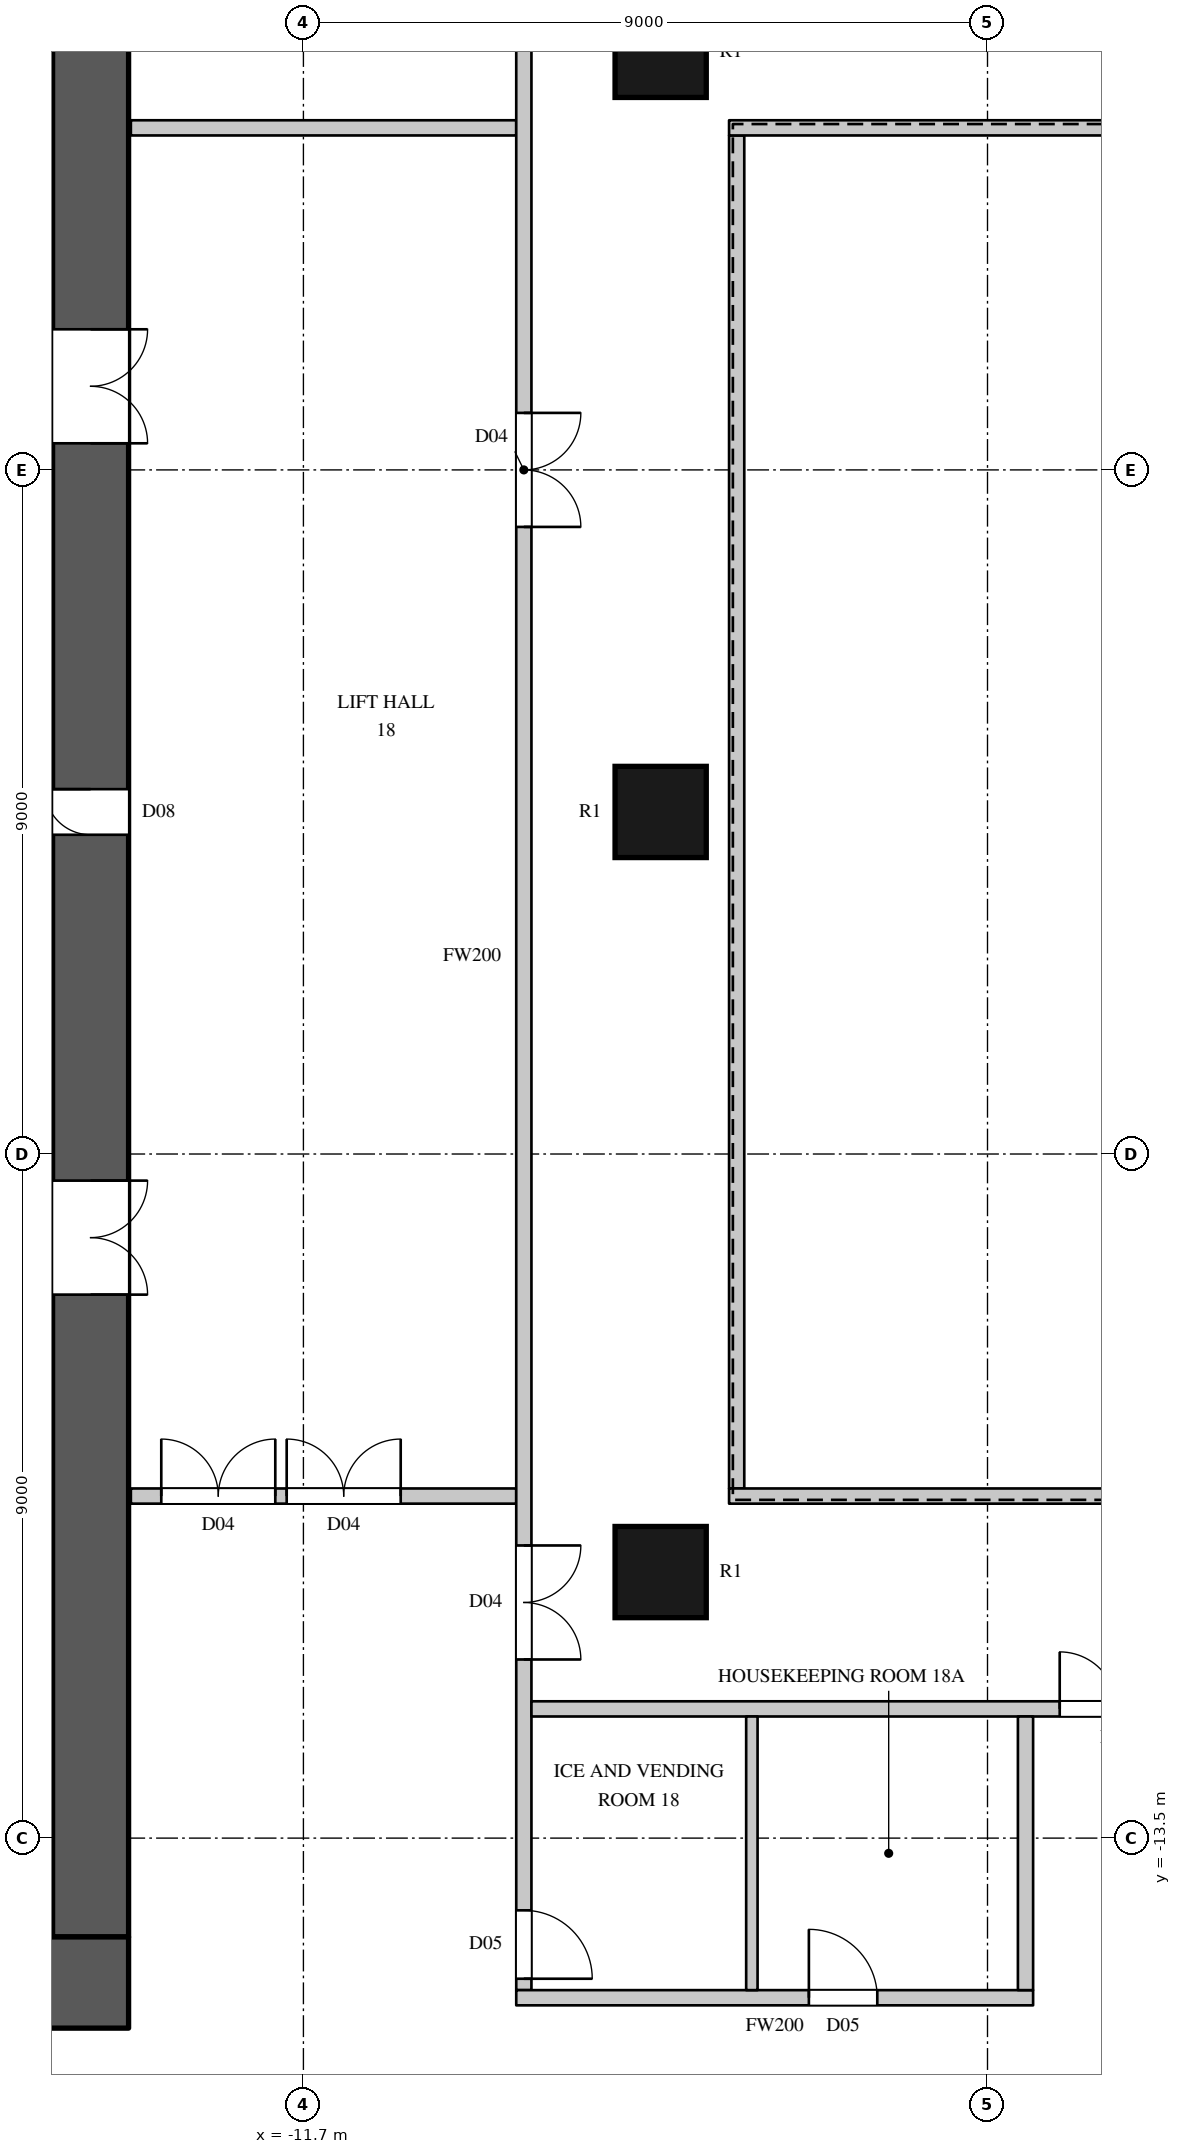
"""IFC4 building model, lengths in metres.
Left out: names, types, materials, properties, quantities, classifications, styles, units other than length and angle.
Written with IfcOpenShell. Run it as: python <this file> out.ifc"""

import sys

from ifc_helpers import new_model, si_unit, direction, frame, frame_2d, origin, origin_2d, place, context, subcontext, project, spatial, rectangle, circle, extrude, element, fill, save


model = new_model("IFC4")
c1 = context("Model", 3, precision=1e-05, world=origin(), true_north=direction((0.0, 1.0)))
c2 = subcontext(c1, "Body", "Model", "MODEL_VIEW")
j1 = project(units=[si_unit("LENGTHUNIT", "METRE"), si_unit("PLANEANGLEUNIT", "RADIAN")], contexts=[c1])
p1 = place(None, origin())
s1 = spatial("IfcSite", under=j1, at=p1, CompositionType="ELEMENT")
p2 = place(p1, origin())
s2 = spatial("IfcBuilding", under=s1, at=p2, CompositionType="ELEMENT")
p3 = place(p2, frame((0.0, 0.0, 95.1)))
s3 = spatial("IfcBuildingStorey", under=s2, at=p3, CompositionType="ELEMENT", Elevation=95.1)
for number, where, z_axis, x_axis in (
    (1, (-7.0, -10.0, 0.0), (0.0, 0.0, 1.0), (1.0, 0.0, 0.0)),
    (2, (-7.0, 0.0, 0.0), (0.0, 0.0, 1.0), (1.0, 0.0, 0.0)),
    (3, (-7.0, 10.0, 0.0), (0.0, 0.0, 1.0), (1.0, 0.0, 0.0)),
):
    element("IfcColumn", number, at=place(p3, frame(where, z_axis=z_axis, x_axis=x_axis)), inside=s3, PredefinedType="COLUMN", context=c2, shape_type="SweptSolid", body=[
        extrude(circle(Radius=0.6, at=origin_2d()), origin(), (0.0, 0.0, 1.0), 3.6),
    ])
p4 = place(p3, frame((-30.0, -15.4, 0.0), z_axis=(0.0, 0.0, 1.0), x_axis=(1.0, 0.0, 0.0)))
e4 = element("IfcWall", 4, at=p4, inside=s3, PredefinedType="SHEAR", context=c2, shape_type="SweptSolid", body=[
    extrude(rectangle(XDim=16.0, YDim=1.2, at=frame_2d((8.0, 0.0))), origin(), (0.0, 0.0, 1.0), 3.6),
])
p5 = place(p4, frame((13.4, 0.0, 0.0)))
e5 = element("IfcOpeningElement", 5, at=p5, cuts=e4, PredefinedType="OPENING", context=c2, shape_type="SweptSolid", body=[
    extrude(rectangle(XDim=1.5, YDim=2.4, at=frame_2d((0.75, 1.2))), frame((0.0, 0.61, 0.0), z_axis=(0.0, -1.0, 0.0), x_axis=(1.0, 0.0, 0.0)), (0.0, 0.0, 1.0), 1.22),
])
p6 = place(p3, frame((-14.5, -14.8, 0.0), z_axis=(0.0, 0.0, 1.0), x_axis=(0.0, 1.0, 0.0)))
e6 = element("IfcWall", 6, at=p6, inside=s3, PredefinedType="SHEAR", context=c2, shape_type="SweptSolid", body=[
    extrude(rectangle(XDim=29.6, YDim=1.0, at=frame_2d((14.8, 0.0))), origin(), (0.0, 0.0, 1.0), 3.6),
])
p7 = place(p6, frame((8.45, 0.0, 0.0)))
e7 = element("IfcOpeningElement", 7, at=p7, cuts=e6, PredefinedType="OPENING", context=c2, shape_type="SweptSolid", body=[
    extrude(rectangle(XDim=1.5, YDim=2.4, at=frame_2d((0.75, 1.2))), frame((0.0, 0.51, 0.0), z_axis=(0.0, -1.0, 0.0), x_axis=(1.0, 0.0, 0.0)), (0.0, 0.0, 1.0), 1.02),
])
p8 = place(p6, frame((19.65, 0.0, 0.0)))
e8 = element("IfcOpeningElement", 8, at=p8, cuts=e6, PredefinedType="OPENING", context=c2, shape_type="SweptSolid", body=[
    extrude(rectangle(XDim=1.5, YDim=2.4, at=frame_2d((0.75, 1.2))), frame((0.0, 0.51, 0.0), z_axis=(0.0, -1.0, 0.0), x_axis=(1.0, 0.0, 0.0)), (0.0, 0.0, 1.0), 1.02),
])
p9 = place(p6, frame((14.5, 0.0, 0.0)))
e9 = element("IfcOpeningElement", 9, at=p9, cuts=e6, PredefinedType="OPENING", context=c2, shape_type="SweptSolid", body=[
    extrude(rectangle(XDim=0.6, YDim=2.0, at=frame_2d((0.3, 1.0))), frame((0.0, 0.51, 0.0), z_axis=(0.0, -1.0, 0.0), x_axis=(1.0, 0.0, 0.0)), (0.0, 0.0, 1.0), 1.02),
])
p10 = place(p3, frame((-13.97, -9.0, 0.0), z_axis=(0.0, 0.0, 1.0), x_axis=(1.0, 0.0, 0.0)))
e10 = element("IfcWall", 10, at=p10, inside=s3, PredefinedType="PARTITIONING", context=c2, shape_type="SweptSolid", body=[
    extrude(rectangle(XDim=5.07, YDim=0.2, at=frame_2d((2.535, 0.0))), origin(), (0.0, 0.0, 1.0), 3.3),
])
p11 = place(p10, frame((0.4, 0.0, 0.0)))
e11 = element("IfcOpeningElement", 11, at=p11, cuts=e10, PredefinedType="OPENING", context=c2, shape_type="SweptSolid", body=[
    extrude(rectangle(XDim=1.5, YDim=2.2, at=frame_2d((0.75, 1.1))), frame((0.0, 0.11, 0.0), z_axis=(0.0, -1.0, 0.0), x_axis=(1.0, 0.0, 0.0)), (0.0, 0.0, 1.0), 0.22),
])
p12 = place(p10, frame((2.05, 0.0, 0.0)))
e12 = element("IfcOpeningElement", 12, at=p12, cuts=e10, PredefinedType="OPENING", context=c2, shape_type="SweptSolid", body=[
    extrude(rectangle(XDim=1.5, YDim=2.2, at=frame_2d((0.75, 1.1))), frame((0.0, 0.11, 0.0), z_axis=(0.0, -1.0, 0.0), x_axis=(1.0, 0.0, 0.0)), (0.0, 0.0, 1.0), 0.22),
])
p13 = place(p3, frame((-13.97, 9.0, 0.0), z_axis=(0.0, 0.0, 1.0), x_axis=(1.0, 0.0, 0.0)))
e13 = element("IfcWall", 13, at=p13, inside=s3, PredefinedType="PARTITIONING", context=c2, shape_type="SweptSolid", body=[
    extrude(rectangle(XDim=5.07, YDim=0.2, at=frame_2d((2.535, 0.0))), origin(), (0.0, 0.0, 1.0), 3.3),
])
p14 = place(p3, frame((-8.8, -15.5, 0.0), z_axis=(0.0, 0.0, 1.0), x_axis=(0.0, 1.0, 0.0)))
e14 = element("IfcWall", 14, at=p14, inside=s3, PredefinedType="PARTITIONING", context=c2, shape_type="SweptSolid", body=[
    extrude(rectangle(XDim=27.2, YDim=0.2, at=frame_2d((13.6, 0.0))), origin(), (0.0, 0.0, 1.0), 3.3),
])
p15 = place(p14, frame((19.25, 0.0, 0.0)))
e15 = element("IfcOpeningElement", 15, at=p15, cuts=e14, PredefinedType="OPENING", context=c2, shape_type="SweptSolid", body=[
    extrude(rectangle(XDim=1.5, YDim=2.2, at=frame_2d((0.75, 1.1))), frame((0.0, 0.11, 0.0), z_axis=(0.0, -1.0, 0.0), x_axis=(1.0, 0.0, 0.0)), (0.0, 0.0, 1.0), 0.22),
])
p16 = place(p14, frame((4.35, 0.0, 0.0)))
e16 = element("IfcOpeningElement", 16, at=p16, cuts=e14, PredefinedType="OPENING", context=c2, shape_type="SweptSolid", body=[
    extrude(rectangle(XDim=1.5, YDim=2.2, at=frame_2d((0.75, 1.1))), frame((0.0, 0.11, 0.0), z_axis=(0.0, -1.0, 0.0), x_axis=(1.0, 0.0, 0.0)), (0.0, 0.0, 1.0), 0.22),
])
p17 = place(p14, frame((25.55, 0.0, 0.0)))
e17 = element("IfcOpeningElement", 17, at=p17, cuts=e14, PredefinedType="OPENING", context=c2, shape_type="SweptSolid", body=[
    extrude(rectangle(XDim=1.5, YDim=2.2, at=frame_2d((0.75, 1.1))), frame((0.0, 0.11, 0.0), z_axis=(0.0, -1.0, 0.0), x_axis=(1.0, 0.0, 0.0)), (0.0, 0.0, 1.0), 0.22),
])
p18 = place(p14, frame((0.15, 0.0, 0.0)))
e18 = element("IfcOpeningElement", 18, at=p18, cuts=e14, PredefinedType="OPENING", context=c2, shape_type="SweptSolid", body=[
    extrude(rectangle(XDim=0.9, YDim=2.2, at=frame_2d((0.45, 1.1))), frame((0.0, 0.11, 0.0), z_axis=(0.0, -1.0, 0.0), x_axis=(1.0, 0.0, 0.0)), (0.0, 0.0, 1.0), 0.22),
])
p19 = place(p3, frame((-8.9, -15.6, 0.0), z_axis=(0.0, 0.0, 1.0), x_axis=(1.0, 0.0, 0.0)))
e19 = element("IfcWall", 19, at=p19, inside=s3, PredefinedType="PARTITIONING", context=c2, shape_type="SweptSolid", body=[
    extrude(rectangle(XDim=6.8, YDim=0.2, at=frame_2d((3.4, 0.0))), origin(), (0.0, 0.0, 1.0), 3.3),
])
p20 = place(p19, frame((3.85, 0.0, 0.0)))
e20 = element("IfcOpeningElement", 20, at=p20, cuts=e19, PredefinedType="OPENING", context=c2, shape_type="SweptSolid", body=[
    extrude(rectangle(XDim=0.9, YDim=2.2, at=frame_2d((0.45, 1.1))), frame((0.0, 0.11, 0.0), z_axis=(0.0, -1.0, 0.0), x_axis=(1.0, 0.0, 0.0)), (0.0, 0.0, 1.0), 0.22),
])
p21 = place(p3, frame((-8.7, -11.8, 0.0), z_axis=(0.0, 0.0, 1.0), x_axis=(1.0, 0.0, 0.0)))
e21 = element("IfcWall", 21, at=p21, inside=s3, PredefinedType="PARTITIONING", context=c2, shape_type="SweptSolid", body=[
    extrude(rectangle(XDim=19.4, YDim=0.2, at=frame_2d((9.7, 0.0))), origin(), (0.0, 0.0, 1.0), 3.3),
])
p22 = place(p21, frame((6.95, 0.0, 0.0)))
e22 = element("IfcOpeningElement", 22, at=p22, cuts=e21, PredefinedType="OPENING", context=c2, shape_type="SweptSolid", body=[
    extrude(rectangle(XDim=1.5, YDim=2.2, at=frame_2d((0.75, 1.1))), frame((0.0, 0.11, 0.0), z_axis=(0.0, -1.0, 0.0), x_axis=(1.0, 0.0, 0.0)), (0.0, 0.0, 1.0), 0.22),
])
p23 = place(p3, frame((-6.0, -8.9, 0.0), z_axis=(0.0, 0.0, 1.0), x_axis=(0.0, 1.0, 0.0)))
e23 = element("IfcWall", 23, at=p23, inside=s3, PredefinedType="PARTITIONING", context=c2, shape_type="SweptSolid", body=[
    extrude(rectangle(XDim=17.8, YDim=0.2, at=frame_2d((8.9, 0.0))), origin(), (0.0, 0.0, 1.0), 3.3),
])
for number, where, z_axis, x_axis in (
    (24, (-6.1, -9.0, 0.0), (0.0, 0.0, 1.0), (1.0, 0.0, 0.0)),
    (25, (-6.1, 9.0, 0.0), (0.0, 0.0, 1.0), (1.0, 0.0, 0.0)),
):
    element("IfcWall", number, at=place(p3, frame(where, z_axis=z_axis, x_axis=x_axis)), inside=s3, PredefinedType="PARTITIONING", context=c2, shape_type="SweptSolid", body=[
        extrude(rectangle(XDim=14.2, YDim=0.2, at=frame_2d((7.1, 0.0))), origin(), (0.0, 0.0, 1.0), 3.3),
    ])
p24 = place(p3, frame((-2.2, -15.5, 0.0), z_axis=(0.0, 0.0, 1.0), x_axis=(0.0, 1.0, 0.0)))
e26 = element("IfcWall", 26, at=p24, inside=s3, PredefinedType="PARTITIONING", context=c2, shape_type="SweptSolid", body=[
    extrude(rectangle(XDim=3.6, YDim=0.2, at=frame_2d((1.8, 0.0))), origin(), (0.0, 0.0, 1.0), 3.3),
])
p25 = place(p3, frame((-5.8, -15.5, 0.0), z_axis=(0.0, 0.0, 1.0), x_axis=(0.0, 1.0, 0.0)))
e27 = element("IfcWall", 27, at=p25, inside=s3, PredefinedType="PARTITIONING", context=c2, shape_type="SweptSolid", body=[
    extrude(rectangle(XDim=3.6, YDim=0.15, at=frame_2d((1.8, 0.0))), origin(), (0.0, 0.0, 1.0), 3.3),
])
p26 = place(p15, origin())
e28 = element("IfcDoor", 28, at=p26, inside=s3, OperationType="DOUBLE_DOOR_SINGLE_SWING", PredefinedType="DOOR", context=c2, shape_type="SweptSolid", body=[
    extrude(rectangle(XDim=1.5, YDim=2.2, at=frame_2d((0.75, 1.1))), frame((0.0, 0.025, 0.0), z_axis=(0.0, -1.0, 0.0), x_axis=(1.0, 0.0, 0.0)), (0.0, 0.0, 1.0), 0.05),
])
fill(e15, e28)
p27 = place(p11, origin())
e29 = element("IfcDoor", 29, at=p27, inside=s3, OperationType="DOUBLE_DOOR_SINGLE_SWING", PredefinedType="DOOR", context=c2, shape_type="SweptSolid", body=[
    extrude(rectangle(XDim=1.5, YDim=2.2, at=frame_2d((0.75, 1.1))), frame((0.0, 0.025, 0.0), z_axis=(0.0, -1.0, 0.0), x_axis=(1.0, 0.0, 0.0)), (0.0, 0.0, 1.0), 0.05),
])
fill(e11, e29)
p28 = place(p12, origin())
e30 = element("IfcDoor", 30, at=p28, inside=s3, OperationType="DOUBLE_DOOR_SINGLE_SWING", PredefinedType="DOOR", context=c2, shape_type="SweptSolid", body=[
    extrude(rectangle(XDim=1.5, YDim=2.2, at=frame_2d((0.75, 1.1))), frame((0.0, 0.025, 0.0), z_axis=(0.0, -1.0, 0.0), x_axis=(1.0, 0.0, 0.0)), (0.0, 0.0, 1.0), 0.05),
])
fill(e12, e30)
p29 = place(p16, origin())
e31 = element("IfcDoor", 31, at=p29, inside=s3, OperationType="DOUBLE_DOOR_SINGLE_SWING", PredefinedType="DOOR", context=c2, shape_type="SweptSolid", body=[
    extrude(rectangle(XDim=1.5, YDim=2.2, at=frame_2d((0.75, 1.1))), frame((0.0, 0.025, 0.0), z_axis=(0.0, -1.0, 0.0), x_axis=(1.0, 0.0, 0.0)), (0.0, 0.0, 1.0), 0.05),
])
fill(e16, e31)
p30 = place(p22, origin())
e32 = element("IfcDoor", 32, at=p30, inside=s3, OperationType="DOUBLE_DOOR_SINGLE_SWING", PredefinedType="DOOR", context=c2, shape_type="SweptSolid", body=[
    extrude(rectangle(XDim=1.5, YDim=2.2, at=frame_2d((0.75, 1.1))), frame((0.0, 0.025, 0.0), z_axis=(0.0, -1.0, 0.0), x_axis=(1.0, 0.0, 0.0)), (0.0, 0.0, 1.0), 0.05),
])
fill(e22, e32)
p31 = place(p18, origin())
e33 = element("IfcDoor", 33, at=p31, inside=s3, OperationType="SINGLE_SWING_RIGHT", PredefinedType="DOOR", context=c2, shape_type="SweptSolid", body=[
    extrude(rectangle(XDim=0.9, YDim=2.2, at=frame_2d((0.45, 1.1))), frame((0.0, 0.025, 0.0), z_axis=(0.0, -1.0, 0.0), x_axis=(1.0, 0.0, 0.0)), (0.0, 0.0, 1.0), 0.05),
])
fill(e18, e33)
p32 = place(p20, origin())
e34 = element("IfcDoor", 34, at=p32, inside=s3, OperationType="SINGLE_SWING_LEFT", PredefinedType="DOOR", context=c2, shape_type="SweptSolid", body=[
    extrude(rectangle(XDim=0.9, YDim=2.2, at=frame_2d((0.45, 1.1))), frame((0.0, 0.025, 0.0), z_axis=(0.0, -1.0, 0.0), x_axis=(1.0, 0.0, 0.0)), (0.0, 0.0, 1.0), 0.05),
])
fill(e20, e34)
p33 = place(p7, origin())
e35 = element("IfcDoor", 35, at=p33, inside=s3, OperationType="DOUBLE_DOOR_SINGLE_SWING", PredefinedType="DOOR", context=c2, shape_type="SweptSolid", body=[
    extrude(rectangle(XDim=1.5, YDim=2.4, at=frame_2d((0.75, 1.2))), frame((0.0, -0.445, 0.0), z_axis=(0.0, -1.0, 0.0), x_axis=(1.0, 0.0, 0.0)), (0.0, 0.0, 1.0), 0.05),
])
fill(e7, e35)
p34 = place(p8, origin())
e36 = element("IfcDoor", 36, at=p34, inside=s3, OperationType="DOUBLE_DOOR_SINGLE_SWING", PredefinedType="DOOR", context=c2, shape_type="SweptSolid", body=[
    extrude(rectangle(XDim=1.5, YDim=2.4, at=frame_2d((0.75, 1.2))), frame((0.0, -0.445, 0.0), z_axis=(0.0, -1.0, 0.0), x_axis=(1.0, 0.0, 0.0)), (0.0, 0.0, 1.0), 0.05),
])
fill(e8, e36)
p35 = place(p9, origin())
e37 = element("IfcDoor", 37, at=p35, inside=s3, OperationType="SINGLE_SWING_RIGHT", PredefinedType="DOOR", context=c2, shape_type="SweptSolid", body=[
    extrude(rectangle(XDim=0.6, YDim=2.0, at=frame_2d((0.3, 1.0))), frame((0.0, 0.495, 0.0), z_axis=(0.0, -1.0, 0.0), x_axis=(1.0, 0.0, 0.0)), (0.0, 0.0, 1.0), 0.05),
])
fill(e9, e37)
save(model, sys.argv[1])
